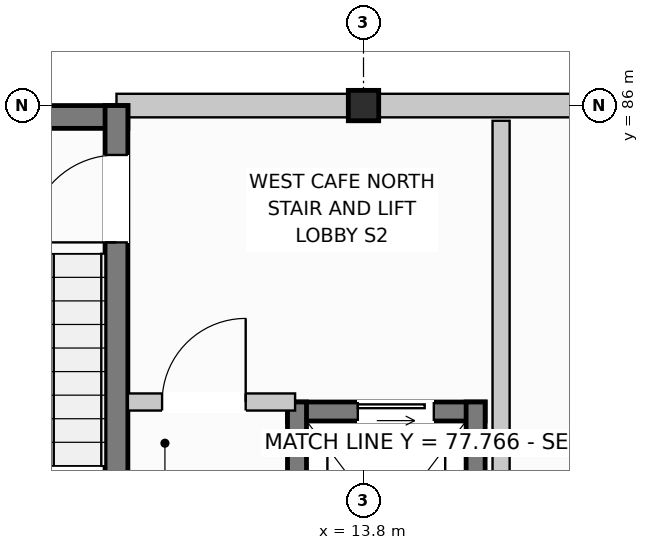
"""IFC4 building model, lengths in metres.
Left out: names, types, materials, properties, quantities, classifications, styles, units other than length and angle.
Written with IfcOpenShell. Run it as: python <this file> out.ifc"""

import sys

from ifc_helpers import new_model, si_unit, direction, frame, frame_2d, origin, origin_with_axes, origin_2d, place, context, subcontext, project, spatial, rectangle, extrude, element, fill, save


model = new_model("IFC4")
c1 = context("Model", 3, precision=1e-05, world=origin(), true_north=direction((0.0, 1.0)))
c2 = subcontext(c1, "Body", "Model", "MODEL_VIEW")
j1 = project(units=[si_unit("LENGTHUNIT", "METRE"), si_unit("PLANEANGLEUNIT", "RADIAN")], contexts=[c1])
p1 = place(None, origin())
s1 = spatial("IfcSite", under=j1, at=p1, CompositionType="ELEMENT")
p2 = place(p1, origin())
s2 = spatial("IfcBuilding", under=s1, at=p2, CompositionType="ELEMENT")
p3 = place(p2, frame((0.0, 0.0, 4.4)))
s3 = spatial("IfcBuildingStorey", under=s2, at=p3, CompositionType="ELEMENT", Elevation=4.4)
p4 = place(p3, frame((13.8, 86.0, 0.0), z_axis=(0.0, 0.0, 1.0), x_axis=(1.0, 0.0, 0.0)))
e1 = element("IfcColumn", 1, at=p4, inside=s3, PredefinedType="COLUMN", context=c2, shape_type="SweptSolid", body=[
    extrude(rectangle(XDim=0.4, YDim=0.4, at=origin_2d()), origin(), (0.0, 0.0, 1.0), 3.6),
])
p5 = place(p3, frame((10.55, 86.0, 0.0), z_axis=(0.0, 0.0, 1.0), x_axis=(1.0, 0.0, 0.0)))
e2 = element("IfcWall", 2, at=p5, inside=s3, PredefinedType="STANDARD", context=c2, shape_type="SweptSolid", body=[
    extrude(rectangle(XDim=10.15, YDim=0.31, at=frame_2d((5.075, 0.0))), origin(), (0.0, 0.0, 1.0), 2.96),
])
p6 = place(p5, frame((6.6, 0.0, 0.9)))
e3 = element("IfcOpeningElement", 3, at=p6, cuts=e2, PredefinedType="OPENING", context=c2, shape_type="SweptSolid", body=[
    extrude(rectangle(XDim=2.0, YDim=1.8, at=frame_2d((1.0, 0.9))), frame((0.0, 0.167, 0.0), z_axis=(0.0, -1.0, 0.0), x_axis=(1.0, 0.0, 0.0)), (0.0, 0.0, 1.0), 0.334),
])
p7 = place(p3, frame((7.2, 85.85, 0.0), z_axis=(0.0, 0.0, 1.0), x_axis=(1.0, 0.0, 0.0)))
e4 = element("IfcWall", 4, at=p7, inside=s3, PredefinedType="SHEAR", context=c2, shape_type="SweptSolid", body=[
    extrude(rectangle(XDim=3.5, YDim=0.3, at=frame_2d((1.75, 0.0))), origin(), (0.0, 0.0, 1.0), 3.33),
])
p8 = place(p3, frame((10.55, 78.5, 0.0), z_axis=(0.0, 0.0, 1.0), x_axis=(0.0, 1.0, 0.0)))
e5 = element("IfcWall", 5, at=p8, inside=s3, PredefinedType="SHEAR", context=c2, shape_type="SweptSolid", body=[
    extrude(rectangle(XDim=7.5, YDim=0.3, at=frame_2d((3.75, 0.0))), origin(), (0.0, 0.0, 1.0), 3.33),
])
p9 = place(p8, frame((5.7, 0.0, 0.0)))
e6 = element("IfcOpeningElement", 6, at=p9, cuts=e5, PredefinedType="OPENING", context=c2, shape_type="SweptSolid", body=[
    extrude(rectangle(XDim=1.15, YDim=2.15, at=frame_2d((0.575, 1.075))), frame((0.0, 0.162, 0.0), z_axis=(0.0, -1.0, 0.0), x_axis=(1.0, 0.0, 0.0)), (0.0, 0.0, 1.0), 0.324),
])
p10 = place(p3, frame((12.8, 81.975, 0.0), z_axis=(0.0, 0.0, 1.0), x_axis=(1.0, 0.0, 0.0)))
e7 = element("IfcWall", 7, at=p10, inside=s3, PredefinedType="SHEAR", context=c2, shape_type="SweptSolid", body=[
    extrude(rectangle(XDim=2.6, YDim=0.25, at=frame_2d((1.3, 0.0))), origin(), (0.0, 0.0, 1.0), 3.33),
])
p11 = place(p10, frame((0.925, 0.0, 0.0)))
e8 = element("IfcOpeningElement", 8, at=p11, cuts=e7, PredefinedType="OPENING", context=c2, shape_type="SweptSolid", body=[
    extrude(rectangle(XDim=1.0, YDim=2.1, at=frame_2d((0.5, 1.05))), frame((0.0, 0.137, 0.0), z_axis=(0.0, -1.0, 0.0), x_axis=(1.0, 0.0, 0.0)), (0.0, 0.0, 1.0), 0.274),
])
for number, where, z_axis, x_axis in (
    (9, (12.925, 78.85, 0.0), (0.0, 0.0, 1.0), (0.0, 1.0, 0.0)),
    (10, (15.275, 78.85, 0.0), (0.0, 0.0, 1.0), (0.0, 1.0, 0.0)),
):
    element("IfcWall", number, at=place(p3, frame(where, z_axis=z_axis, x_axis=x_axis)), inside=s3, PredefinedType="SHEAR", context=c2, shape_type="SweptSolid", body=[
        extrude(rectangle(XDim=3.25, YDim=0.25, at=frame_2d((1.625, 0.0))), origin(), (0.0, 0.0, 1.0), 3.33),
    ])
p12 = place(p3, frame((15.61, 78.2, 0.0), z_axis=(0.0, 0.0, 1.0), x_axis=(0.0, 1.0, 0.0)))
e11 = element("IfcWall", 11, at=p12, inside=s3, PredefinedType="PARTITIONING", context=c2, shape_type="SweptSolid", body=[
    extrude(rectangle(XDim=7.6, YDim=0.225, at=frame_2d((3.8, 0.0))), origin(), (0.0, 0.0, 1.0), 3.33),
])
p13 = place(p3, frame((10.7, 82.1, 0.0), z_axis=(0.0, 0.0, 1.0), x_axis=(1.0, 0.0, 0.0)))
e12 = element("IfcWall", 12, at=p13, inside=s3, PredefinedType="PARTITIONING", context=c2, shape_type="SweptSolid", body=[
    extrude(rectangle(XDim=2.2, YDim=0.225, at=frame_2d((1.1, 0.0))), origin(), (0.0, 0.0, 1.0), 3.33),
])
p14 = place(p13, frame((0.45, 0.0, 0.0)))
e13 = element("IfcOpeningElement", 13, at=p14, cuts=e12, PredefinedType="OPENING", context=c2, shape_type="SweptSolid", body=[
    extrude(rectangle(XDim=1.1, YDim=2.15, at=frame_2d((0.55, 1.075))), frame((0.0, 0.125, 0.0), z_axis=(0.0, -1.0, 0.0), x_axis=(1.0, 0.0, 0.0)), (0.0, 0.0, 1.0), 0.249),
])
p15 = place(p9, origin_with_axes())
e14 = element("IfcDoor", 14, at=p15, inside=s3, OperationType="SINGLE_SWING_LEFT", PredefinedType="DOOR", context=c2, shape_type="SweptSolid", body=[
    extrude(rectangle(XDim=1.15, YDim=2.15, at=frame_2d((0.575, 1.075))), frame((0.0, 0.025, 0.0), z_axis=(0.0, -1.0, 0.0), x_axis=(1.0, 0.0, 0.0)), (0.0, 0.0, 1.0), 0.05),
])
fill(e6, e14)
p16 = place(p11, origin_with_axes())
e15 = element("IfcDoor", 15, at=p16, inside=s3, OperationType="SLIDING_TO_LEFT", PredefinedType="DOOR", context=c2, shape_type="SweptSolid", body=[
    extrude(rectangle(XDim=1.0, YDim=2.1, at=frame_2d((0.5, 1.05))), frame((0.0, 0.025, 0.0), z_axis=(0.0, -1.0, 0.0), x_axis=(1.0, 0.0, 0.0)), (0.0, 0.0, 1.0), 0.05),
])
fill(e8, e15)
p17 = place(p14, origin_with_axes())
e16 = element("IfcDoor", 16, at=p17, inside=s3, OperationType="SINGLE_SWING_RIGHT", PredefinedType="DOOR", context=c2, shape_type="SweptSolid", body=[
    extrude(rectangle(XDim=1.1, YDim=2.15, at=frame_2d((0.55, 1.075))), frame((0.0, 0.025, 0.0), z_axis=(0.0, -1.0, 0.0), x_axis=(1.0, 0.0, 0.0)), (0.0, 0.0, 1.0), 0.05),
])
fill(e13, e16)
save(model, sys.argv[1])
